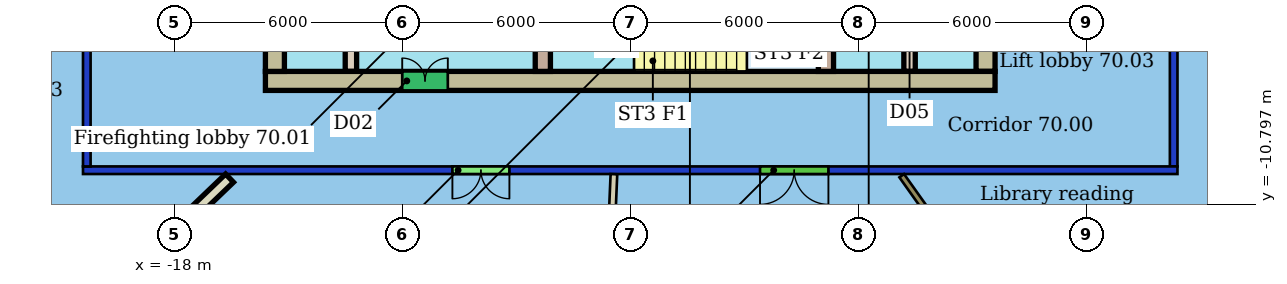
"""IFC4 building model, lengths in metres.
Left out: names, types, materials, properties, quantities, classifications, styles, units other than length and angle.
Written with IfcOpenShell. Run it as: python <this file> out.ifc"""

import sys

from ifc_helpers import new_model, si_unit, direction, frame, frame_2d, origin, place, context, subcontext, project, spatial, rectangle, extrude, element, fill, save


model = new_model("IFC4")
c1 = context("Model", 3, precision=1e-05, world=origin(), true_north=direction((0.0, 1.0)))
c2 = subcontext(c1, "Body", "Model", "MODEL_VIEW")
j1 = project(units=[si_unit("LENGTHUNIT", "METRE"), si_unit("PLANEANGLEUNIT", "RADIAN")], contexts=[c1])
p1 = place(None, origin())
s1 = spatial("IfcSite", under=j1, at=p1, CompositionType="ELEMENT")
p2 = place(p1, origin())
s2 = spatial("IfcBuilding", under=s1, at=p2, CompositionType="ELEMENT")
p3 = place(p2, frame((0.0, 0.0, 282.9)))
s3 = spatial("IfcBuildingStorey", under=s2, at=p3, CompositionType="ELEMENT", Elevation=282.9)
p4 = place(p3, frame((8.4, -9.9, 0.0), z_axis=(0.0, 0.0, 1.0), x_axis=(-1.0, 0.0, 0.0)))
e1 = element("IfcWall", 1, at=p4, inside=s3, PredefinedType="PARTITIONING", context=c2, shape_type="SweptSolid", body=[
    extrude(rectangle(XDim=28.8, YDim=0.2, at=frame_2d((14.4, 0.0))), origin(), (0.0, 0.0, 1.0), 3.1),
])
p5 = place(p4, frame((17.579, 0.0, 0.0)))
e2 = element("IfcOpeningElement", 2, at=p5, cuts=e1, PredefinedType="OPENING", context=c2, shape_type="SweptSolid", body=[
    extrude(rectangle(XDim=1.5, YDim=2.4, at=frame_2d((0.75, 1.2))), frame((0.0, 0.11, 0.0), z_axis=(0.0, -1.0, 0.0), x_axis=(1.0, 0.0, 0.0)), (0.0, 0.0, 1.0), 0.22),
])
p6 = place(p4, frame((9.185, 0.0, 0.0)))
e3 = element("IfcOpeningElement", 3, at=p6, cuts=e1, PredefinedType="OPENING", context=c2, shape_type="SweptSolid", body=[
    extrude(rectangle(XDim=1.8, YDim=2.4, at=frame_2d((0.9, 1.2))), frame((0.0, 0.11, 0.0), z_axis=(0.0, -1.0, 0.0), x_axis=(1.0, 0.0, 0.0)), (0.0, 0.0, 1.0), 0.22),
])
p7 = place(p3, frame((-20.3, -9.8, 0.0), z_axis=(0.0, 0.0, 1.0), x_axis=(0.0, 1.0, 0.0)))
e4 = element("IfcWall", 4, at=p7, inside=s3, PredefinedType="PARTITIONING", context=c2, shape_type="SweptSolid", body=[
    extrude(rectangle(XDim=19.6, YDim=0.2, at=frame_2d((9.8, 0.0))), origin(), (0.0, 0.0, 1.0), 3.1),
])
p8 = place(p7, frame((5.449, 0.0, 0.0)))
e5 = element("IfcOpeningElement", 5, at=p8, cuts=e4, PredefinedType="OPENING", context=c2, shape_type="SweptSolid", body=[
    extrude(rectangle(XDim=1.8, YDim=2.4, at=frame_2d((0.9, 1.2))), frame((0.0, 0.11, 0.0), z_axis=(0.0, -1.0, 0.0), x_axis=(1.0, 0.0, 0.0)), (0.0, 0.0, 1.0), 0.22),
])
p9 = place(p3, frame((8.3, 9.8, 0.0), z_axis=(0.0, 0.0, 1.0), x_axis=(0.0, -1.0, 0.0)))
e6 = element("IfcWall", 6, at=p9, inside=s3, PredefinedType="PARTITIONING", context=c2, shape_type="SweptSolid", body=[
    extrude(rectangle(XDim=19.6, YDim=0.2, at=frame_2d((9.8, 0.0))), origin(), (0.0, 0.0, 1.0), 3.1),
])
p10 = place(p9, frame((14.189, 0.0, 0.0)))
e7 = element("IfcOpeningElement", 7, at=p10, cuts=e6, PredefinedType="OPENING", context=c2, shape_type="SweptSolid", body=[
    extrude(rectangle(XDim=1.5, YDim=2.1, at=frame_2d((0.75, 1.05))), frame((0.0, 0.11, 0.0), z_axis=(0.0, -1.0, 0.0), x_axis=(1.0, 0.0, 0.0)), (0.0, 0.0, 1.0), 0.22),
])
p11 = place(p9, frame((9.651, 0.0, 0.0)))
e8 = element("IfcOpeningElement", 8, at=p11, cuts=e6, PredefinedType="OPENING", context=c2, shape_type="SweptSolid", body=[
    extrude(rectangle(XDim=1.5, YDim=2.4, at=frame_2d((0.75, 1.2))), frame((0.0, 0.11, 0.0), z_axis=(0.0, -1.0, 0.0), x_axis=(1.0, 0.0, 0.0)), (0.0, 0.0, 1.0), 0.22),
])
p12 = place(p9, frame((4.201, 0.0, 0.0)))
e9 = element("IfcOpeningElement", 9, at=p12, cuts=e6, PredefinedType="OPENING", context=c2, shape_type="SweptSolid", body=[
    extrude(rectangle(XDim=1.5, YDim=2.1, at=frame_2d((0.75, 1.05))), frame((0.0, 0.11, 0.0), z_axis=(0.0, -1.0, 0.0), x_axis=(1.0, 0.0, 0.0)), (0.0, 0.0, 1.0), 0.22),
])
p13 = place(p3, frame((-23.568, -16.842, 0.0), z_axis=(0.0, 0.0, 1.0), x_axis=(0.721865986277, 0.692032873393, 0.0)))
e10 = element("IfcWall", 10, at=p13, inside=s3, PredefinedType="PARTITIONING", context=c2, shape_type="SweptSolid", body=[
    extrude(rectangle(XDim=9.73, YDim=0.3, at=frame_2d((4.865, 0.0))), origin(), (0.0, 0.0, 1.0), 3.45),
])
p14 = place(p3, frame((-7.023, -23.871, 0.0), z_axis=(0.0, 0.0, 1.0), x_axis=(0.042831131953, 0.999082326005, 0.0)))
e11 = element("IfcWall", 11, at=p14, inside=s3, PredefinedType="PARTITIONING", context=c2, shape_type="SweptSolid", body=[
    extrude(rectangle(XDim=13.88, YDim=0.175, at=frame_2d((6.94, 0.0))), origin(), (0.0, 0.0, 1.0), 3.45),
])
p15 = place(p3, frame((6.232, -17.198, 0.0), z_axis=(0.0, 0.0, 1.0), x_axis=(-0.579606269786, 0.814896663402, 0.0)))
e12 = element("IfcWall", 12, at=p15, inside=s3, PredefinedType="PARTITIONING", context=c2, shape_type="SweptSolid", body=[
    extrude(rectangle(XDim=8.78, YDim=0.15, at=frame_2d((4.39, 0.0))), origin(), (0.0, 0.0, 1.0), 3.45),
])
p16 = place(p3, frame((-15.6, -7.55, 0.0), z_axis=(0.0, 0.0, 1.0), x_axis=(1.0, 0.0, 0.0)))
e13 = element("IfcWall", 13, at=p16, inside=s3, PredefinedType="SHEAR", context=c2, shape_type="SweptSolid", body=[
    extrude(rectangle(XDim=19.2, YDim=0.5, at=frame_2d((9.6, 0.0))), origin(), (0.0, 0.0, 1.0), 3.3),
])
p17 = place(p16, frame((3.6, 0.0, 0.0)))
e14 = element("IfcOpeningElement", 14, at=p17, cuts=e13, PredefinedType="OPENING", context=c2, shape_type="SweptSolid", body=[
    extrude(rectangle(XDim=1.2, YDim=2.1, at=frame_2d((0.6, 1.05))), frame((0.0, 0.26, 0.0), z_axis=(0.0, -1.0, 0.0), x_axis=(1.0, 0.0, 0.0)), (0.0, 0.0, 1.0), 0.52),
])
p18 = place(p3, frame((-15.35, 7.3, 0.0), z_axis=(0.0, 0.0, 1.0), x_axis=(0.0, -1.0, 0.0)))
e15 = element("IfcWall", 15, at=p18, inside=s3, PredefinedType="SHEAR", context=c2, shape_type="SweptSolid", body=[
    extrude(rectangle(XDim=14.6, YDim=0.5, at=frame_2d((7.3, 0.0))), origin(), (0.0, 0.0, 1.0), 3.3),
])
p19 = place(p18, frame((10.6, 0.0, 0.0)))
e16 = element("IfcOpeningElement", 16, at=p19, cuts=e15, PredefinedType="OPENING", context=c2, shape_type="SweptSolid", body=[
    extrude(rectangle(XDim=1.2, YDim=2.1, at=frame_2d((0.6, 1.05))), frame((0.0, 0.26, 0.0), z_axis=(0.0, -1.0, 0.0), x_axis=(1.0, 0.0, 0.0)), (0.0, 0.0, 1.0), 0.52),
])
p20 = place(p18, frame((2.8, 0.0, 0.0)))
e17 = element("IfcOpeningElement", 17, at=p20, cuts=e15, PredefinedType="OPENING", context=c2, shape_type="SweptSolid", body=[
    extrude(rectangle(XDim=1.2, YDim=2.1, at=frame_2d((0.6, 1.05))), frame((0.0, 0.26, 0.0), z_axis=(0.0, -1.0, 0.0), x_axis=(1.0, 0.0, 0.0)), (0.0, 0.0, 1.0), 0.52),
])
p21 = place(p3, frame((3.35, -7.3, 0.0), z_axis=(0.0, 0.0, 1.0), x_axis=(0.0, 1.0, 0.0)))
e18 = element("IfcWall", 18, at=p21, inside=s3, PredefinedType="SHEAR", context=c2, shape_type="SweptSolid", body=[
    extrude(rectangle(XDim=14.6, YDim=0.5, at=frame_2d((7.3, 0.0))), origin(), (0.0, 0.0, 1.0), 3.3),
])
p22 = place(p21, frame((2.8, 0.0, 0.0)))
e19 = element("IfcOpeningElement", 19, at=p22, cuts=e18, PredefinedType="OPENING", context=c2, shape_type="SweptSolid", body=[
    extrude(rectangle(XDim=1.2, YDim=2.1, at=frame_2d((0.6, 1.05))), frame((0.0, 0.26, 0.0), z_axis=(0.0, -1.0, 0.0), x_axis=(1.0, 0.0, 0.0)), (0.0, 0.0, 1.0), 0.52),
])
p23 = place(p21, frame((10.6, 0.0, 0.0)))
e20 = element("IfcOpeningElement", 20, at=p23, cuts=e18, PredefinedType="OPENING", context=c2, shape_type="SweptSolid", body=[
    extrude(rectangle(XDim=1.2, YDim=2.1, at=frame_2d((0.6, 1.05))), frame((0.0, 0.26, 0.0), z_axis=(0.0, -1.0, 0.0), x_axis=(1.0, 0.0, 0.0)), (0.0, 0.0, 1.0), 0.52),
])
p24 = place(p3, frame((-13.35, 7.3, 0.0), z_axis=(0.0, 0.0, 1.0), x_axis=(0.0, -1.0, 0.0)))
e21 = element("IfcWall", 21, at=p24, inside=s3, PredefinedType="SHEAR", context=c2, shape_type="SweptSolid", body=[
    extrude(rectangle(XDim=14.6, YDim=0.3, at=frame_2d((7.3, 0.0))), origin(), (0.0, 0.0, 1.0), 3.3),
])
p25 = place(p24, frame((6.55, 0.0, 0.0)))
e22 = element("IfcOpeningElement", 22, at=p25, cuts=e21, PredefinedType="OPENING", context=c2, shape_type="SweptSolid", body=[
    extrude(rectangle(XDim=1.5, YDim=2.1, at=frame_2d((0.75, 1.05))), frame((0.0, 0.16, 0.0), z_axis=(0.0, -1.0, 0.0), x_axis=(1.0, 0.0, 0.0)), (0.0, 0.0, 1.0), 0.32),
])
p26 = place(p3, frame((1.35, -7.3, 0.0), z_axis=(0.0, 0.0, 1.0), x_axis=(0.0, 1.0, 0.0)))
e23 = element("IfcWall", 23, at=p26, inside=s3, PredefinedType="SHEAR", context=c2, shape_type="SweptSolid", body=[
    extrude(rectangle(XDim=14.6, YDim=0.3, at=frame_2d((7.3, 0.0))), origin(), (0.0, 0.0, 1.0), 3.3),
])
p27 = place(p26, frame((1.21, 0.0, 0.0)))
e24 = element("IfcOpeningElement", 24, at=p27, cuts=e23, PredefinedType="OPENING", context=c2, shape_type="SweptSolid", body=[
    extrude(rectangle(XDim=1.0, YDim=2.1, at=frame_2d((0.5, 1.05))), frame((0.0, 0.16, 0.0), z_axis=(0.0, -1.0, 0.0), x_axis=(1.0, 0.0, 0.0)), (0.0, 0.0, 1.0), 0.32),
])
p28 = place(p26, frame((6.55, 0.0, 0.0)))
e25 = element("IfcOpeningElement", 25, at=p28, cuts=e23, PredefinedType="OPENING", context=c2, shape_type="SweptSolid", body=[
    extrude(rectangle(XDim=1.5, YDim=2.1, at=frame_2d((0.75, 1.05))), frame((0.0, 0.16, 0.0), z_axis=(0.0, -1.0, 0.0), x_axis=(1.0, 0.0, 0.0)), (0.0, 0.0, 1.0), 0.32),
])
p29 = place(p3, frame((-8.3, -3.88, 0.0), z_axis=(0.0, 0.0, 1.0), x_axis=(0.0, -1.0, 0.0)))
e26 = element("IfcWall", 26, at=p29, inside=s3, PredefinedType="SHEAR", context=c2, shape_type="SweptSolid", body=[
    extrude(rectangle(XDim=3.42, YDim=0.4, at=frame_2d((1.71, 0.0))), origin(), (0.0, 0.0, 1.0), 3.3),
])
p30 = place(p29, frame((1.11, 0.0, 0.0)))
e27 = element("IfcOpeningElement", 27, at=p30, cuts=e26, PredefinedType="OPENING", context=c2, shape_type="SweptSolid", body=[
    extrude(rectangle(XDim=1.2, YDim=2.1, at=frame_2d((0.6, 1.05))), frame((0.0, 0.21, 0.0), z_axis=(0.0, -1.0, 0.0), x_axis=(1.0, 0.0, 0.0)), (0.0, 0.0, 1.0), 0.42),
])
p31 = place(p3, frame((-0.85, -3.88, 0.0), z_axis=(0.0, 0.0, 1.0), x_axis=(0.0, -1.0, 0.0)))
e28 = element("IfcWall", 28, at=p31, inside=s3, PredefinedType="SHEAR", context=c2, shape_type="SweptSolid", body=[
    extrude(rectangle(XDim=3.42, YDim=0.4, at=frame_2d((1.71, 0.0))), origin(), (0.0, 0.0, 1.0), 3.3),
])
p32 = place(p5, origin())
e29 = element("IfcDoor", 29, at=p32, inside=s3, OperationType="DOUBLE_DOOR_SINGLE_SWING", PredefinedType="DOOR", context=c2, shape_type="SweptSolid", body=[
    extrude(rectangle(XDim=1.5, YDim=2.4, at=frame_2d((0.75, 1.2))), frame((0.0, 0.025, 0.0), z_axis=(0.0, -1.0, 0.0), x_axis=(1.0, 0.0, 0.0)), (0.0, 0.0, 1.0), 0.05),
])
fill(e2, e29)
p33 = place(p6, origin())
e30 = element("IfcDoor", 30, at=p33, inside=s3, OperationType="DOUBLE_DOOR_SINGLE_SWING", PredefinedType="DOOR", context=c2, shape_type="SweptSolid", body=[
    extrude(rectangle(XDim=1.8, YDim=2.4, at=frame_2d((0.9, 1.2))), frame((0.0, 0.025, 0.0), z_axis=(0.0, -1.0, 0.0), x_axis=(1.0, 0.0, 0.0)), (0.0, 0.0, 1.0), 0.05),
])
fill(e3, e30)
p34 = place(p17, origin())
e31 = element("IfcDoor", 31, at=p34, inside=s3, OperationType="DOUBLE_DOOR_SINGLE_SWING", PredefinedType="NOTDEFINED", context=c2, shape_type="SweptSolid", body=[
    extrude(rectangle(XDim=1.2, YDim=2.1, at=frame_2d((0.6, 1.05))), frame((0.0, 0.025, 0.0), z_axis=(0.0, -1.0, 0.0), x_axis=(1.0, 0.0, 0.0)), (0.0, 0.0, 1.0), 0.05),
])
fill(e14, e31)
save(model, sys.argv[1])
